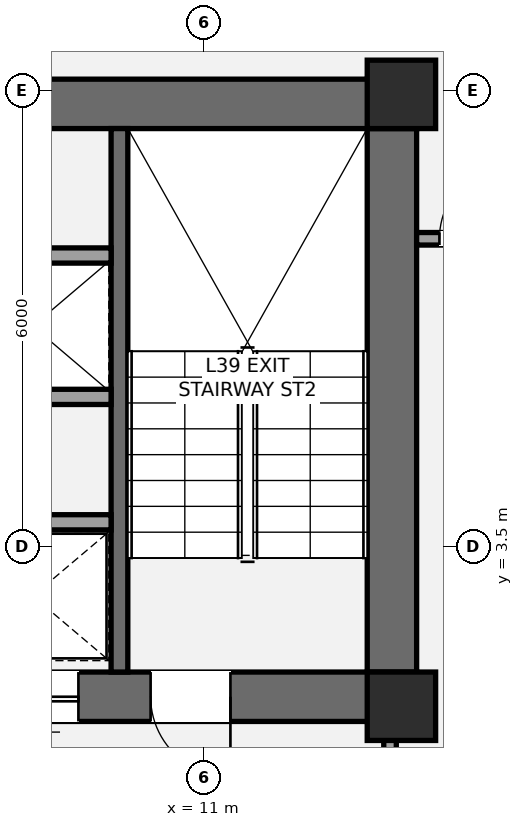
"""IFC4 building model, lengths in metres.
Left out: names, types, materials, properties, quantities, classifications, styles, units other than length and angle.
Written with IfcOpenShell. Run it as: python <this file> out.ifc"""

import sys

from ifc_helpers import new_model, si_unit, direction, frame, frame_2d, origin, origin_2d, place, context, subcontext, project, spatial, rectangle, extrude, element, fill, save


model = new_model("IFC4")
c1 = context("Model", 3, precision=1e-05, world=origin(), true_north=direction((0.0, 1.0)))
c2 = subcontext(c1, "Body", "Model", "MODEL_VIEW")
j1 = project(units=[si_unit("LENGTHUNIT", "METRE"), si_unit("PLANEANGLEUNIT", "RADIAN")], contexts=[c1])
p1 = place(None, origin())
s1 = spatial("IfcSite", under=j1, at=p1, CompositionType="ELEMENT")
p2 = place(p1, origin())
s2 = spatial("IfcBuilding", under=s1, at=p2, CompositionType="ELEMENT")
p3 = place(p2, frame((0.0, 0.0, 147.0)))
s3 = spatial("IfcBuildingStorey", under=s2, at=p3, CompositionType="ELEMENT", Elevation=147.0)
p4 = place(p3, frame((13.475, 1.2, 0.0), z_axis=(0.0, 0.0, 1.0), x_axis=(0.0, 1.0, 0.0)))
e1 = element("IfcWall", 1, at=p4, inside=s3, PredefinedType="SHEAR", context=c2, shape_type="SweptSolid", body=[
    extrude(rectangle(XDim=8.45, YDim=0.65, at=frame_2d((4.225, 0.0))), origin(), (0.0, 0.0, 1.0), 3.2),
])
p5 = place(p3, frame((4.475, 9.325, 0.0), z_axis=(0.0, 0.0, 1.0), x_axis=(1.0, 0.0, 0.0)))
e2 = element("IfcWall", 2, at=p5, inside=s3, PredefinedType="SHEAR", context=c2, shape_type="SweptSolid", body=[
    extrude(rectangle(XDim=9.325, YDim=0.65, at=frame_2d((4.663, 0.0))), origin(), (0.0, 0.0, 1.0), 3.2),
])
p6 = place(p3, frame((13.8, 1.525, 0.0), z_axis=(0.0, 0.0, 1.0), x_axis=(-1.0, 0.0, 0.0)))
e3 = element("IfcWall", 3, at=p6, inside=s3, PredefinedType="SHEAR", context=c2, shape_type="SweptSolid", body=[
    extrude(rectangle(XDim=8.925, YDim=0.65, at=frame_2d((4.462, 0.0))), origin(), (0.0, 0.0, 1.0), 3.2),
])
p7 = place(p6, frame((2.45, 0.0, 0.0)))
e4 = element("IfcOpeningElement", 4, at=p7, cuts=e3, PredefinedType="OPENING", context=c2, shape_type="SweptSolid", body=[
    extrude(rectangle(XDim=1.05, YDim=2.15, at=frame_2d((0.525, 1.075))), frame((0.0, 0.335, 0.0), z_axis=(0.0, -1.0, 0.0), x_axis=(1.0, 0.0, 0.0)), (0.0, 0.0, 1.0), 0.67),
])
p8 = place(p6, frame((4.45, 0.0, 0.0)))
e5 = element("IfcOpeningElement", 5, at=p8, cuts=e3, PredefinedType="OPENING", context=c2, shape_type="SweptSolid", body=[
    extrude(rectangle(XDim=1.1, YDim=2.2, at=frame_2d((0.55, 1.1))), frame((0.0, 0.335, 0.0), z_axis=(0.0, -1.0, 0.0), x_axis=(1.0, 0.0, 0.0)), (0.0, 0.0, 1.0), 0.67),
])
p9 = place(p3, frame((9.89, 1.85, 0.0), z_axis=(0.0, 0.0, 1.0), x_axis=(0.0, 1.0, 0.0)))
e6 = element("IfcWall", 6, at=p9, inside=s3, PredefinedType="SHEAR", context=c2, shape_type="SweptSolid", body=[
    extrude(rectangle(XDim=7.15, YDim=0.22, at=frame_2d((3.575, 0.0))), origin(), (0.0, 0.0, 1.0), 3.2),
])
for number, where, z_axis, x_axis in (
    (7, (13.6, 1.4, 0.0), (0.0, 0.0, 1.0), (1.0, 0.0, 0.0)),
    (8, (13.6, 9.45, 0.0), (0.0, 0.0, 1.0), (1.0, 0.0, 0.0)),
):
    element("IfcColumn", number, at=place(p3, frame(where, z_axis=z_axis, x_axis=x_axis)), inside=s3, PredefinedType="COLUMN", context=c2, shape_type="SweptSolid", body=[
        extrude(rectangle(XDim=0.9, YDim=0.9, at=origin_2d()), origin(), (0.0, 0.0, 1.0), 3.2),
    ])
p10 = place(p3, frame((13.45, -2.15, 0.0), z_axis=(0.0, 0.0, 1.0), x_axis=(0.0, 1.0, 0.0)))
e9 = element("IfcWall", 9, at=p10, inside=s3, PredefinedType="PARTITIONING", context=c2, shape_type="SweptSolid", body=[
    extrude(rectangle(XDim=3.4, YDim=0.165, at=frame_2d((1.7, 0.0))), origin(), (0.0, 0.0, 1.0), 2.473),
])
p11 = place(p10, frame((1.15, 0.0, 0.0)))
e10 = element("IfcOpeningElement", 10, at=p11, cuts=e9, PredefinedType="OPENING", context=c2, shape_type="SweptSolid", body=[
    extrude(rectangle(XDim=1.05, YDim=2.15, at=frame_2d((0.525, 1.075))), frame((0.0, 0.093, 0.0), z_axis=(0.0, -1.0, 0.0), x_axis=(1.0, 0.0, 0.0)), (0.0, 0.0, 1.0), 0.185),
])
p12 = place(p3, frame((5.525, 3.82, 0.0), z_axis=(0.0, 0.0, 1.0), x_axis=(1.0, 0.0, 0.0)))
e11 = element("IfcWall", 11, at=p12, inside=s3, PredefinedType="SOLIDWALL", context=c2, shape_type="SweptSolid", body=[
    extrude(rectangle(XDim=4.255, YDim=0.2, at=frame_2d((2.127, 0.0))), origin(), (0.0, 0.0, 1.0), 3.02),
])
p13 = place(p12, frame((0.65, 0.0, 0.0)))
e12 = element("IfcOpeningElement", 12, at=p13, cuts=e11, PredefinedType="OPENING", context=c2, shape_type="SweptSolid", body=[
    extrude(rectangle(XDim=1.2, YDim=2.2, at=frame_2d((0.6, 1.1))), frame((0.0, 0.11, 0.0), z_axis=(0.0, -1.0, 0.0), x_axis=(1.0, 0.0, 0.0)), (0.0, 0.0, 1.0), 0.22),
])
for number, where, z_axis, x_axis in (
    (13, (5.525, 5.47, 0.0), (0.0, 0.0, 1.0), (1.0, 0.0, 0.0)),
    (14, (5.525, 7.33, 0.0), (0.0, 0.0, 1.0), (1.0, 0.0, 0.0)),
):
    element("IfcWall", number, at=place(p3, frame(where, z_axis=z_axis, x_axis=x_axis)), inside=s3, PredefinedType="SOLIDWALL", context=c2, shape_type="SweptSolid", body=[
        extrude(rectangle(XDim=4.255, YDim=0.2, at=frame_2d((2.127, 0.0))), origin(), (0.0, 0.0, 1.0), 3.02),
    ])
p14 = place(p3, frame((13.8, 7.55, 0.0), z_axis=(0.0, 0.0, 1.0), x_axis=(1.0, 0.0, 0.0)))
e15 = element("IfcWall", 15, at=p14, inside=s3, PredefinedType="PARTITIONING", context=c2, shape_type="SweptSolid", body=[
    extrude(rectangle(XDim=1.75, YDim=0.165, at=frame_2d((0.875, 0.0))), origin(), (0.0, 0.0, 1.0), 2.473),
])
p15 = place(p14, frame((0.3, 0.0, 0.0)))
e16 = element("IfcOpeningElement", 16, at=p15, cuts=e15, PredefinedType="OPENING", context=c2, shape_type="SweptSolid", body=[
    extrude(rectangle(XDim=1.0, YDim=2.15, at=frame_2d((0.5, 1.075))), frame((0.0, 0.093, 0.0), z_axis=(0.0, -1.0, 0.0), x_axis=(1.0, 0.0, 0.0)), (0.0, 0.0, 1.0), 0.185),
])
p16 = place(p7, origin())
e17 = element("IfcDoor", 17, at=p16, inside=s3, OperationType="SINGLE_SWING_LEFT", PredefinedType="DOOR", context=c2, shape_type="SweptSolid", body=[
    extrude(rectangle(XDim=1.05, YDim=2.15, at=frame_2d((0.525, 1.075))), frame((0.0, 0.025, 0.0), z_axis=(0.0, -1.0, 0.0), x_axis=(1.0, 0.0, 0.0)), (0.0, 0.0, 1.0), 0.05),
])
fill(e4, e17)
p17 = place(p8, origin())
e18 = element("IfcDoor", 18, at=p17, inside=s3, OperationType="SLIDING_TO_LEFT", PredefinedType="DOOR", context=c2, shape_type="SweptSolid", body=[
    extrude(rectangle(XDim=1.1, YDim=2.2, at=frame_2d((0.55, 1.1))), frame((0.0, 0.025, 0.0), z_axis=(0.0, -1.0, 0.0), x_axis=(1.0, 0.0, 0.0)), (0.0, 0.0, 1.0), 0.05),
])
fill(e5, e18)
p18 = place(p15, origin())
e19 = element("IfcDoor", 19, at=p18, inside=s3, OperationType="SINGLE_SWING_RIGHT", PredefinedType="DOOR", context=c2, shape_type="SweptSolid", body=[
    extrude(rectangle(XDim=1.0, YDim=2.15, at=frame_2d((0.5, 1.075))), frame((0.0, 0.025, 0.0), z_axis=(0.0, -1.0, 0.0), x_axis=(1.0, 0.0, 0.0)), (0.0, 0.0, 1.0), 0.05),
])
fill(e16, e19)
save(model, sys.argv[1])
